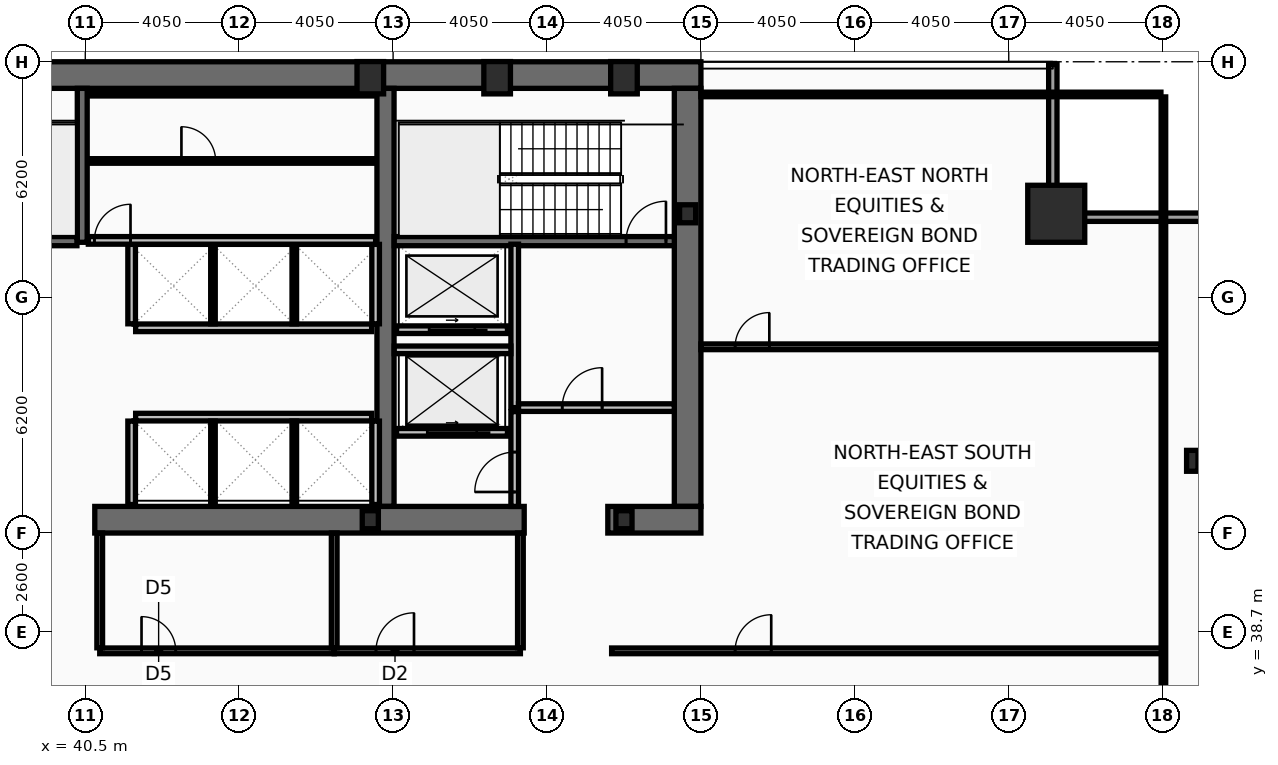
"""IFC4 building model, lengths in metres.
Left out: names, types, materials, properties, quantities, classifications, styles, units other than length and angle.
Written with IfcOpenShell. Run it as: python <this file> out.ifc"""

import sys

from ifc_helpers import new_model, si_unit, direction, frame, frame_2d, origin, origin_2d, place, context, subcontext, project, spatial, rectangle, hollow_rectangle, i_section, extrude, element, fill, save


model = new_model("IFC4")
c1 = context("Model", 3, precision=1e-05, world=origin(), true_north=direction((0.0, 1.0)))
c2 = subcontext(c1, "Body", "Model", "MODEL_VIEW")
j1 = project(units=[si_unit("LENGTHUNIT", "METRE"), si_unit("PLANEANGLEUNIT", "RADIAN")], contexts=[c1])
p1 = place(None, origin())
s1 = spatial("IfcSite", under=j1, at=p1, CompositionType="ELEMENT")
p2 = place(p1, origin())
s2 = spatial("IfcBuilding", under=s1, at=p2, CompositionType="ELEMENT")
p3 = place(p2, frame((0.0, 0.0, 98.6)))
s3 = spatial("IfcBuildingStorey", under=s2, at=p3, CompositionType="ELEMENT", Elevation=98.6)
p4 = place(p3, frame((16.2, 53.35, 0.0), z_axis=(0.0, 0.0, 1.0), x_axis=(1.0, 0.0, 0.0)))
e1 = element("IfcWall", 1, at=p4, inside=s3, PredefinedType="SHEAR", context=c2, shape_type="SweptSolid", body=[
    extrude(rectangle(XDim=40.5, YDim=0.7, at=frame_2d((20.25, 0.0))), origin(), (0.0, 0.0, 1.0), 3.82),
])
p5 = place(p3, frame((56.35, 53.0, 0.0), z_axis=(0.0, 0.0, 1.0), x_axis=(0.0, -1.0, 0.0)))
e2 = element("IfcWall", 2, at=p5, inside=s3, PredefinedType="SHEAR", context=c2, shape_type="SweptSolid", body=[
    extrude(rectangle(XDim=11.0, YDim=0.7, at=frame_2d((5.5, 0.0))), origin(), (0.0, 0.0, 1.0), 3.82),
])
p6 = place(p3, frame((48.4, 42.0, 0.0), z_axis=(0.0, 0.0, 1.0), x_axis=(0.0, 1.0, 0.0)))
e3 = element("IfcWall", 3, at=p6, inside=s3, PredefinedType="SHEAR", context=c2, shape_type="SweptSolid", body=[
    extrude(rectangle(XDim=11.0, YDim=0.45, at=frame_2d((5.5, 0.0))), origin(), (0.0, 0.0, 1.0), 3.82),
])
p7 = place(p3, frame((52.05, 41.65, 0.0), z_axis=(0.0, 0.0, 1.0), x_axis=(-1.0, 0.0, 0.0)))
e4 = element("IfcWall", 4, at=p7, inside=s3, PredefinedType="SHEAR", context=c2, shape_type="SweptSolid", body=[
    extrude(rectangle(XDim=11.3, YDim=0.7, at=frame_2d((5.65, 0.0))), origin(), (0.0, 0.0, 1.0), 3.82),
])
p8 = place(p3, frame((56.7, 41.65, 0.0), z_axis=(0.0, 0.0, 1.0), x_axis=(-1.0, 0.0, 0.0)))
e5 = element("IfcWall", 5, at=p8, inside=s3, PredefinedType="SHEAR", context=c2, shape_type="SweptSolid", body=[
    extrude(rectangle(XDim=2.45, YDim=0.7, at=frame_2d((1.225, 0.0))), origin(), (0.0, 0.0, 1.0), 3.82),
])
p9 = place(p3, frame((40.42, 48.95, 0.0), z_axis=(0.0, 0.0, 1.0), x_axis=(0.0, 1.0, 0.0)))
e6 = element("IfcWall", 6, at=p9, inside=s3, PredefinedType="SHEAR", context=c2, shape_type="SweptSolid", body=[
    extrude(rectangle(XDim=4.05, YDim=0.26, at=frame_2d((2.025, 0.0))), origin(), (0.0, 0.0, 1.0), 3.82),
])
p10 = place(p3, frame((48.63, 48.98, 0.0), z_axis=(0.0, 0.0, 1.0), x_axis=(1.0, 0.0, 0.0)))
e7 = element("IfcWall", 7, at=p10, inside=s3, PredefinedType="SHEAR", context=c2, shape_type="SweptSolid", body=[
    extrude(rectangle(XDim=7.37, YDim=0.24, at=frame_2d((3.685, 0.0))), origin(), (0.0, 0.0, 1.0), 3.82),
])
p11 = place(p10, frame((6.1, 0.0, 0.0)))
e8 = element("IfcOpeningElement", 8, at=p11, cuts=e7, PredefinedType="OPENING", context=c2, shape_type="SweptSolid", body=[
    extrude(rectangle(XDim=1.05, YDim=2.15, at=frame_2d((0.525, 1.075))), frame((0.0, 0.13, 0.0), z_axis=(0.0, -1.0, 0.0), x_axis=(1.0, 0.0, 0.0)), (0.0, 0.0, 1.0), 0.26),
])
p12 = place(p3, frame((32.72, 48.98, 0.0), z_axis=(0.0, 0.0, 1.0), x_axis=(1.0, 0.0, 0.0)))
e9 = element("IfcWall", 9, at=p12, inside=s3, PredefinedType="SHEAR", context=c2, shape_type="SweptSolid", body=[
    extrude(rectangle(XDim=7.56, YDim=0.24, at=frame_2d((3.78, 0.0))), origin(), (0.0, 0.0, 1.0), 3.82),
])
p13 = place(p12, frame((0.22, 0.0, 0.0)))
e10 = element("IfcOpeningElement", 10, at=p13, cuts=e9, PredefinedType="OPENING", context=c2, shape_type="SweptSolid", body=[
    extrude(rectangle(XDim=1.05, YDim=2.15, at=frame_2d((0.525, 1.075))), frame((0.0, 0.13, 0.0), z_axis=(0.0, -1.0, 0.0), x_axis=(1.0, 0.0, 0.0)), (0.0, 0.0, 1.0), 0.26),
])
p14 = place(p3, frame((66.05, 49.7, 0.0), z_axis=(0.0, 0.0, 1.0), x_axis=(1.0, 0.0, 0.0)))
e11 = element("IfcColumn", 11, at=p14, inside=s3, PredefinedType="COLUMN", context=c2, shape_type="SweptSolid", body=[
    extrude(hollow_rectangle(XDim=1.5, YDim=1.5, WallThickness=0.07, at=origin_2d()), origin(), (0.0, 0.0, 1.0), 4.0),
])
for number, where, z_axis, x_axis in (
    (12, (48.0, 53.28, 0.0), (0.0, 0.0, 1.0), (1.0, 0.0, 0.0)),
    (13, (51.337, 53.28, 0.0), (0.0, 0.0, 1.0), (1.0, 0.0, 0.0)),
    (14, (54.675, 53.28, 0.0), (0.0, 0.0, 1.0), (1.0, 0.0, 0.0)),
):
    element("IfcColumn", number, at=place(p3, frame(where, z_axis=z_axis, x_axis=x_axis)), inside=s3, PredefinedType="COLUMN", context=c2, shape_type="SweptSolid", body=[
        extrude(hollow_rectangle(XDim=0.7, YDim=0.85, WallThickness=0.05, at=origin_2d()), origin(), (0.0, 0.0, 1.0), 4.0),
    ])
p15 = place(p3, frame((69.63, 43.2, 0.0), z_axis=(0.0, 0.0, 1.0), x_axis=(1.0, 0.0, 0.0)))
e15 = element("IfcColumn", 15, at=p15, inside=s3, PredefinedType="COLUMN", context=c2, shape_type="SweptSolid", body=[
    extrude(i_section(OverallWidth=0.3, OverallDepth=0.55, WebThickness=0.015, FlangeThickness=0.029, at=origin_2d()), origin(), (0.0, 0.0, 1.0), 4.0),
])
for number, where, z_axis, x_axis in (
    (16, (56.35, 49.7, 0.0), (0.0, 0.0, 1.0), (1.0, 0.0, 0.0)),
    (17, (48.0, 41.65, 0.0), (0.0, 0.0, 1.0), (1.0, 0.0, 0.0)),
    (18, (54.675, 41.65, 0.0), (0.0, 0.0, 1.0), (1.0, 0.0, 0.0)),
):
    element("IfcColumn", number, at=place(p3, frame(where, z_axis=z_axis, x_axis=x_axis)), inside=s3, PredefinedType="COLUMN", context=c2, shape_type="SweptSolid", body=[
        extrude(i_section(OverallWidth=0.424, OverallDepth=0.474, WebThickness=0.048, FlangeThickness=0.077, at=origin_2d()), origin(), (0.0, 0.0, 1.0), 4.0),
    ])
p16 = place(p3, frame((65.96, 53.63, 0.0), z_axis=(0.0, 0.0, 1.0), x_axis=(0.0, -1.0, 0.0)))
e19 = element("IfcWall", 19, at=p16, inside=s3, PredefinedType="SOLIDWALL", context=c2, shape_type="SweptSolid", body=[
    extrude(rectangle(XDim=3.91, YDim=0.22, at=frame_2d((1.955, 0.0))), origin(), (0.0, 0.0, 1.0), 3.16),
])
p17 = place(p3, frame((65.85, 49.61, 0.0), z_axis=(0.0, 0.0, 1.0), x_axis=(1.0, 0.0, 0.0)))
e20 = element("IfcWall", 20, at=p17, inside=s3, PredefinedType="SOLIDWALL", context=c2, shape_type="SweptSolid", body=[
    extrude(rectangle(XDim=4.22, YDim=0.22, at=frame_2d((2.11, 0.0))), origin(), (0.0, 0.0, 1.0), 3.16),
])
p18 = place(p3, frame((51.61, 43.95, 0.0), z_axis=(0.0, 0.0, 1.0), x_axis=(-1.0, 0.0, 0.0)))
e21 = element("IfcWall", 21, at=p18, inside=s3, PredefinedType="PARTITIONING", context=c2, shape_type="SweptSolid", body=[
    extrude(rectangle(XDim=2.92, YDim=0.2, at=frame_2d((1.46, 0.0))), origin(), (0.0, 0.0, 1.0), 3.82),
])
p19 = place(p18, frame((0.81, 0.0, 0.0)))
e22 = element("IfcOpeningElement", 22, at=p19, cuts=e21, PredefinedType="OPENING", context=c2, shape_type="SweptSolid", body=[
    extrude(rectangle(XDim=1.3, YDim=2.18, at=frame_2d((0.65, 1.09))), frame((0.0, 0.11, 0.0), z_axis=(0.0, -1.0, 0.0), x_axis=(1.0, 0.0, 0.0)), (0.0, 0.0, 1.0), 0.22),
])
p20 = place(p3, frame((51.61, 46.65, 0.0), z_axis=(0.0, 0.0, 1.0), x_axis=(-1.0, 0.0, 0.0)))
e23 = element("IfcWall", 23, at=p20, inside=s3, PredefinedType="PARTITIONING", context=c2, shape_type="SweptSolid", body=[
    extrude(rectangle(XDim=2.92, YDim=0.2, at=frame_2d((1.46, 0.0))), origin(), (0.0, 0.0, 1.0), 3.82),
])
p21 = place(p20, frame((0.86, 0.0, 0.0)))
e24 = element("IfcOpeningElement", 24, at=p21, cuts=e23, PredefinedType="OPENING", context=c2, shape_type="SweptSolid", body=[
    extrude(rectangle(XDim=1.2, YDim=2.18, at=frame_2d((0.6, 1.09))), frame((0.0, 0.11, 0.0), z_axis=(0.0, -1.0, 0.0), x_axis=(1.0, 0.0, 0.0)), (0.0, 0.0, 1.0), 0.22),
])
p22 = place(p3, frame((51.8, 44.6, 0.0), z_axis=(0.0, 0.0, 1.0), x_axis=(0.0, 1.0, 0.0)))
e25 = element("IfcWall", 25, at=p22, inside=s3, PredefinedType="PARTITIONING", context=c2, shape_type="SweptSolid", body=[
    extrude(rectangle(XDim=4.3, YDim=0.2, at=frame_2d((2.15, 0.0))), origin(), (0.0, 0.0, 1.0), 3.82),
])
p23 = place(p3, frame((51.9, 44.6, 0.0), z_axis=(0.0, 0.0, 1.0), x_axis=(1.0, 0.0, 0.0)))
e26 = element("IfcWall", 26, at=p23, inside=s3, PredefinedType="PARTITIONING", context=c2, shape_type="SweptSolid", body=[
    extrude(rectangle(XDim=4.1, YDim=0.2, at=frame_2d((2.05, 0.0))), origin(), (0.0, 0.0, 1.0), 3.82),
])
p24 = place(p23, frame((1.15, 0.0, 0.0)))
e27 = element("IfcOpeningElement", 27, at=p24, cuts=e26, PredefinedType="OPENING", context=c2, shape_type="SweptSolid", body=[
    extrude(rectangle(XDim=1.05, YDim=2.15, at=frame_2d((0.525, 1.075))), frame((0.0, 0.11, 0.0), z_axis=(0.0, -1.0, 0.0), x_axis=(1.0, 0.0, 0.0)), (0.0, 0.0, 1.0), 0.22),
])
p25 = place(p3, frame((48.63, 46.12, 0.0), z_axis=(0.0, 0.0, 1.0), x_axis=(1.0, 0.0, 0.0)))
e28 = element("IfcWall", 28, at=p25, inside=s3, PredefinedType="PARTITIONING", context=c2, shape_type="SweptSolid", body=[
    extrude(rectangle(XDim=3.07, YDim=0.2, at=frame_2d((1.535, 0.0))), origin(), (0.0, 0.0, 1.0), 3.82),
])
p26 = place(p3, frame((51.8, 42.0, 0.0), z_axis=(0.0, 0.0, 1.0), x_axis=(0.0, 1.0, 0.0)))
e29 = element("IfcWall", 29, at=p26, inside=s3, PredefinedType="PARTITIONING", context=c2, shape_type="SweptSolid", body=[
    extrude(rectangle(XDim=2.495, YDim=0.2, at=frame_2d((1.248, 0.0))), origin(), (0.0, 0.0, 1.0), 3.82),
])
p27 = place(p26, frame((0.38, 0.0, 0.0)))
e30 = element("IfcOpeningElement", 30, at=p27, cuts=e29, PredefinedType="OPENING", context=c2, shape_type="SweptSolid", body=[
    extrude(rectangle(XDim=1.05, YDim=2.15, at=frame_2d((0.525, 1.075))), frame((0.0, 0.11, 0.0), z_axis=(0.0, -1.0, 0.0), x_axis=(1.0, 0.0, 0.0)), (0.0, 0.0, 1.0), 0.22),
])
p28 = place(p3, frame((41.825, 46.7, 0.0), z_axis=(0.0, 0.0, 1.0), x_axis=(1.0, 0.0, 0.0)))
e31 = element("IfcWall", 31, at=p28, inside=s3, PredefinedType="PARTITIONING", context=c2, shape_type="SweptSolid", body=[
    extrude(rectangle(XDim=6.21, YDim=0.2, at=frame_2d((3.105, 0.0))), origin(), (0.0, 0.0, 1.0), 3.82),
])
for number, where, z_axis, x_axis in (
    (32, (41.72, 46.805, 0.0), (0.0, 0.0, 1.0), (0.0, 1.0, 0.0)),
    (33, (48.14, 46.805, 0.0), (0.0, 0.0, 1.0), (0.0, 1.0, 0.0)),
):
    element("IfcWall", number, at=place(p3, frame(where, z_axis=z_axis, x_axis=x_axis)), inside=s3, PredefinedType="PARTITIONING", context=c2, shape_type="SweptSolid", body=[
        extrude(rectangle(XDim=2.09, YDim=0.2, at=frame_2d((1.045, 0.0))), origin(), (0.0, 0.0, 1.0), 3.82),
    ])
for number, where, z_axis, x_axis in (
    (34, (43.86, 46.805, 0.0), (0.0, 0.0, 1.0), (0.0, 1.0, 0.0)),
    (35, (46.0, 46.805, 0.0), (0.0, 0.0, 1.0), (0.0, 1.0, 0.0)),
):
    element("IfcWall", number, at=place(p3, frame(where, z_axis=z_axis, x_axis=x_axis)), inside=s3, PredefinedType="PARTITIONING", context=c2, shape_type="SweptSolid", body=[
        extrude(rectangle(XDim=2.09, YDim=0.12, at=frame_2d((1.045, 0.0))), origin(), (0.0, 0.0, 1.0), 3.82),
    ])
p29 = place(p3, frame((41.825, 44.35, 0.0), z_axis=(0.0, 0.0, 1.0), x_axis=(1.0, 0.0, 0.0)))
e36 = element("IfcWall", 36, at=p29, inside=s3, PredefinedType="PARTITIONING", context=c2, shape_type="SweptSolid", body=[
    extrude(rectangle(XDim=6.21, YDim=0.2, at=frame_2d((3.105, 0.0))), origin(), (0.0, 0.0, 1.0), 3.82),
])
for number, where, z_axis, x_axis in (
    (37, (41.72, 42.05, 0.0), (0.0, 0.0, 1.0), (0.0, 1.0, 0.0)),
    (38, (48.14, 42.05, 0.0), (0.0, 0.0, 1.0), (0.0, 1.0, 0.0)),
):
    element("IfcWall", number, at=place(p3, frame(where, z_axis=z_axis, x_axis=x_axis)), inside=s3, PredefinedType="PARTITIONING", context=c2, shape_type="SweptSolid", body=[
        extrude(rectangle(XDim=2.195, YDim=0.2, at=frame_2d((1.098, 0.0))), origin(), (0.0, 0.0, 1.0), 3.82),
    ])
for number, where, z_axis, x_axis in (
    (39, (43.86, 42.05, 0.0), (0.0, 0.0, 1.0), (0.0, 1.0, 0.0)),
    (40, (46.0, 42.05, 0.0), (0.0, 0.0, 1.0), (0.0, 1.0, 0.0)),
):
    element("IfcWall", number, at=place(p3, frame(where, z_axis=z_axis, x_axis=x_axis)), inside=s3, PredefinedType="PARTITIONING", context=c2, shape_type="SweptSolid", body=[
        extrude(rectangle(XDim=2.195, YDim=0.12, at=frame_2d((1.098, 0.0))), origin(), (0.0, 0.0, 1.0), 3.82),
    ])
p30 = place(p3, frame((40.58, 52.86, 0.0), z_axis=(0.0, 0.0, 1.0), x_axis=(1.0, 0.0, 0.0)))
e41 = element("IfcWall", 41, at=p30, inside=s3, PredefinedType="PARTITIONING", context=c2, shape_type="SweptSolid", body=[
    extrude(rectangle(XDim=7.56, YDim=0.12, at=frame_2d((3.78, 0.0))), origin(), (0.0, 0.0, 1.0), 3.82),
])
p31 = place(p3, frame((40.58, 49.0, 0.0), z_axis=(0.0, 0.0, 1.0), x_axis=(1.0, 0.0, 0.0)))
e42 = element("IfcWall", 42, at=p31, inside=s3, PredefinedType="PARTITIONING", context=c2, shape_type="SweptSolid", body=[
    extrude(rectangle(XDim=7.56, YDim=0.2, at=frame_2d((3.78, 0.0))), origin(), (0.0, 0.0, 1.0), 3.82),
])
p32 = place(p31, frame((0.16, 0.0, 0.0)))
e43 = element("IfcOpeningElement", 43, at=p32, cuts=e42, PredefinedType="OPENING", context=c2, shape_type="SweptSolid", body=[
    extrude(rectangle(XDim=0.95, YDim=2.1, at=frame_2d((0.475, 1.05))), frame((0.0, 0.11, 0.0), z_axis=(0.0, -1.0, 0.0), x_axis=(1.0, 0.0, 0.0)), (0.0, 0.0, 1.0), 0.22),
])
p33 = place(p3, frame((40.63, 51.09, 0.0), z_axis=(0.0, 0.0, 1.0), x_axis=(1.0, 0.0, 0.0)))
e44 = element("IfcWall", 44, at=p33, inside=s3, PredefinedType="PARTITIONING", context=c2, shape_type="SweptSolid", body=[
    extrude(rectangle(XDim=7.46, YDim=0.12, at=frame_2d((3.73, 0.0))), origin(), (0.0, 0.0, 1.0), 3.82),
])
p34 = place(p33, frame((2.4, 0.0, 0.0)))
e45 = element("IfcOpeningElement", 45, at=p34, cuts=e44, PredefinedType="OPENING", context=c2, shape_type="SweptSolid", body=[
    extrude(rectangle(XDim=0.9, YDim=2.05, at=frame_2d((0.45, 1.025))), frame((0.0, 0.07, 0.0), z_axis=(0.0, -1.0, 0.0), x_axis=(1.0, 0.0, 0.0)), (0.0, 0.0, 1.0), 0.14),
])
p35 = place(p3, frame((40.88, 38.2, 0.0), z_axis=(0.0, 0.0, 1.0), x_axis=(1.0, 0.0, 0.0)))
e46 = element("IfcWall", 46, at=p35, inside=s3, PredefinedType="PARTITIONING", context=c2, shape_type="SweptSolid", body=[
    extrude(rectangle(XDim=6.17, YDim=0.15, at=frame_2d((3.085, 0.0))), origin(), (0.0, 0.0, 1.0), 3.01),
])
p36 = place(p35, frame((1.1, 0.0, 0.0)))
e47 = element("IfcOpeningElement", 47, at=p36, cuts=e46, PredefinedType="OPENING", context=c2, shape_type="SweptSolid", body=[
    extrude(rectangle(XDim=0.9, YDim=2.05, at=frame_2d((0.45, 1.025))), frame((0.0, 0.085, 0.0), z_axis=(0.0, -1.0, 0.0), x_axis=(1.0, 0.0, 0.0)), (0.0, 0.0, 1.0), 0.17),
])
p37 = place(p3, frame((47.05, 38.2, 0.0), z_axis=(0.0, 0.0, 1.0), x_axis=(1.0, 0.0, 0.0)))
e48 = element("IfcWall", 48, at=p37, inside=s3, PredefinedType="PARTITIONING", context=c2, shape_type="SweptSolid", body=[
    extrude(rectangle(XDim=4.9, YDim=0.15, at=frame_2d((2.45, 0.0))), origin(), (0.0, 0.0, 1.0), 3.01),
])
p38 = place(p37, frame((1.1, 0.0, 0.0)))
e49 = element("IfcOpeningElement", 49, at=p38, cuts=e48, PredefinedType="OPENING", context=c2, shape_type="SweptSolid", body=[
    extrude(rectangle(XDim=1.0, YDim=2.05, at=frame_2d((0.5, 1.025))), frame((0.0, 0.085, 0.0), z_axis=(0.0, -1.0, 0.0), x_axis=(1.0, 0.0, 0.0)), (0.0, 0.0, 1.0), 0.17),
])
for number, where, z_axis, x_axis in (
    (50, (40.88, 38.28, 0.0), (0.0, 0.0, 1.0), (0.0, 1.0, 0.0)),
    (51, (47.05, 38.28, 0.0), (0.0, 0.0, 1.0), (0.0, 1.0, 0.0)),
    (52, (51.95, 38.28, 0.0), (0.0, 0.0, 1.0), (0.0, 1.0, 0.0)),
):
    element("IfcWall", number, at=place(p3, frame(where, z_axis=z_axis, x_axis=x_axis)), inside=s3, PredefinedType="PARTITIONING", context=c2, shape_type="SweptSolid", body=[
        extrude(rectangle(XDim=3.02, YDim=0.15, at=frame_2d((1.51, 0.0))), origin(), (0.0, 0.0, 1.0), 3.82),
    ])
p39 = place(p3, frame((54.35, 38.2, 0.0), z_axis=(0.0, 0.0, 1.0), x_axis=(1.0, 0.0, 0.0)))
e53 = element("IfcWall", 53, at=p39, inside=s3, PredefinedType="PARTITIONING", context=c2, shape_type="SweptSolid", body=[
    extrude(rectangle(XDim=14.52, YDim=0.15, at=frame_2d((7.26, 0.0))), origin(), (0.0, 0.0, 1.0), 3.01),
])
p40 = place(p39, frame((3.25, 0.0, 0.0)))
e54 = element("IfcOpeningElement", 54, at=p40, cuts=e53, PredefinedType="OPENING", context=c2, shape_type="SweptSolid", body=[
    extrude(rectangle(XDim=0.95, YDim=2.05, at=frame_2d((0.475, 1.025))), frame((0.0, 0.085, 0.0), z_axis=(0.0, -1.0, 0.0), x_axis=(1.0, 0.0, 0.0)), (0.0, 0.0, 1.0), 0.17),
])
p41 = place(p3, frame((56.7, 46.2, 0.0), z_axis=(0.0, 0.0, 1.0), x_axis=(1.0, 0.0, 0.0)))
e55 = element("IfcWall", 55, at=p41, inside=s3, PredefinedType="PARTITIONING", context=c2, shape_type="SweptSolid", body=[
    extrude(rectangle(XDim=12.105, YDim=0.15, at=frame_2d((6.052, 0.0))), origin(), (0.0, 0.0, 1.0), 3.16),
])
p42 = place(p41, frame((0.9, 0.0, 0.0)))
e56 = element("IfcOpeningElement", 56, at=p42, cuts=e55, PredefinedType="OPENING", context=c2, shape_type="SweptSolid", body=[
    extrude(rectangle(XDim=0.9, YDim=2.05, at=frame_2d((0.45, 1.025))), frame((0.0, 0.085, 0.0), z_axis=(0.0, -1.0, 0.0), x_axis=(1.0, 0.0, 0.0)), (0.0, 0.0, 1.0), 0.17),
])
p43 = place(p3, frame((68.87, 10.665, 0.0), z_axis=(0.0, 0.0, 1.0), x_axis=(0.0, 1.0, 0.0)))
e57 = element("IfcWall", 57, at=p43, inside=s3, PredefinedType="PARTITIONING", context=c2, shape_type="SweptSolid", body=[
    extrude(rectangle(XDim=42.11, YDim=0.12, at=frame_2d((21.055, 0.0))), origin(), (0.0, 0.0, 1.0), 3.01),
])
p44 = place(p3, frame((56.7, 52.84, 0.0), z_axis=(0.0, 0.0, 1.0), x_axis=(1.0, 0.0, 0.0)))
e58 = element("IfcWall", 58, at=p44, inside=s3, PredefinedType="PARTITIONING", context=c2, shape_type="SweptSolid", body=[
    extrude(rectangle(XDim=12.105, YDim=0.12, at=frame_2d((6.052, 0.0))), origin(), (0.0, 0.0, 1.0), 3.82),
])
p45 = place(p11, origin())
e59 = element("IfcDoor", 59, at=p45, inside=s3, OperationType="SINGLE_SWING_RIGHT", PredefinedType="DOOR", context=c2, shape_type="SweptSolid", body=[
    extrude(rectangle(XDim=1.05, YDim=2.15, at=frame_2d((0.525, 1.075))), frame((0.0, 0.025, 0.0), z_axis=(0.0, -1.0, 0.0), x_axis=(1.0, 0.0, 0.0)), (0.0, 0.0, 1.0), 0.05),
])
fill(e8, e59)
p46 = place(p19, origin())
e60 = element("IfcDoor", 60, at=p46, inside=s3, OperationType="SLIDING_TO_LEFT", PredefinedType="DOOR", context=c2, shape_type="SweptSolid", body=[
    extrude(rectangle(XDim=1.3, YDim=2.18, at=frame_2d((0.65, 1.09))), frame((0.0, 0.025, 0.0), z_axis=(0.0, -1.0, 0.0), x_axis=(1.0, 0.0, 0.0)), (0.0, 0.0, 1.0), 0.05),
])
fill(e22, e60)
p47 = place(p21, origin())
e61 = element("IfcDoor", 61, at=p47, inside=s3, OperationType="SLIDING_TO_LEFT", PredefinedType="DOOR", context=c2, shape_type="SweptSolid", body=[
    extrude(rectangle(XDim=1.2, YDim=2.18, at=frame_2d((0.6, 1.09))), frame((0.0, 0.025, 0.0), z_axis=(0.0, -1.0, 0.0), x_axis=(1.0, 0.0, 0.0)), (0.0, 0.0, 1.0), 0.05),
])
fill(e24, e61)
p48 = place(p24, origin())
e62 = element("IfcDoor", 62, at=p48, inside=s3, OperationType="SINGLE_SWING_RIGHT", PredefinedType="DOOR", context=c2, shape_type="SweptSolid", body=[
    extrude(rectangle(XDim=1.05, YDim=2.15, at=frame_2d((0.525, 1.075))), frame((0.0, 0.025, 0.0), z_axis=(0.0, -1.0, 0.0), x_axis=(1.0, 0.0, 0.0)), (0.0, 0.0, 1.0), 0.05),
])
fill(e27, e62)
p49 = place(p27, origin())
e63 = element("IfcDoor", 63, at=p49, inside=s3, OperationType="SINGLE_SWING_LEFT", PredefinedType="DOOR", context=c2, shape_type="SweptSolid", body=[
    extrude(rectangle(XDim=1.05, YDim=2.15, at=frame_2d((0.525, 1.075))), frame((0.0, 0.025, 0.0), z_axis=(0.0, -1.0, 0.0), x_axis=(1.0, 0.0, 0.0)), (0.0, 0.0, 1.0), 0.05),
])
fill(e30, e63)
p50 = place(p32, origin())
e64 = element("IfcDoor", 64, at=p50, inside=s3, OperationType="SINGLE_SWING_RIGHT", PredefinedType="DOOR", context=c2, shape_type="SweptSolid", body=[
    extrude(rectangle(XDim=0.95, YDim=2.1, at=frame_2d((0.475, 1.05))), frame((0.0, 0.025, 0.0), z_axis=(0.0, -1.0, 0.0), x_axis=(1.0, 0.0, 0.0)), (0.0, 0.0, 1.0), 0.05),
])
fill(e43, e64)
p51 = place(p34, origin())
e65 = element("IfcDoor", 65, at=p51, inside=s3, OperationType="SINGLE_SWING_LEFT", PredefinedType="DOOR", context=c2, shape_type="SweptSolid", body=[
    extrude(rectangle(XDim=0.9, YDim=2.05, at=frame_2d((0.45, 1.025))), frame((0.0, 0.025, 0.0), z_axis=(0.0, -1.0, 0.0), x_axis=(1.0, 0.0, 0.0)), (0.0, 0.0, 1.0), 0.05),
])
fill(e45, e65)
p52 = place(p36, origin())
e66 = element("IfcDoor", 66, at=p52, inside=s3, OperationType="SINGLE_SWING_LEFT", PredefinedType="DOOR", context=c2, shape_type="SweptSolid", body=[
    extrude(rectangle(XDim=0.9, YDim=2.05, at=frame_2d((0.45, 1.025))), frame((0.0, 0.025, 0.0), z_axis=(0.0, -1.0, 0.0), x_axis=(1.0, 0.0, 0.0)), (0.0, 0.0, 1.0), 0.05),
])
fill(e47, e66)
p53 = place(p38, origin())
e67 = element("IfcDoor", 67, at=p53, inside=s3, OperationType="SINGLE_SWING_RIGHT", PredefinedType="DOOR", context=c2, shape_type="SweptSolid", body=[
    extrude(rectangle(XDim=1.0, YDim=2.05, at=frame_2d((0.5, 1.025))), frame((0.0, 0.025, 0.0), z_axis=(0.0, -1.0, 0.0), x_axis=(1.0, 0.0, 0.0)), (0.0, 0.0, 1.0), 0.05),
])
fill(e49, e67)
p54 = place(p40, origin())
e68 = element("IfcDoor", 68, at=p54, inside=s3, OperationType="SINGLE_SWING_RIGHT", PredefinedType="DOOR", context=c2, shape_type="SweptSolid", body=[
    extrude(rectangle(XDim=0.95, YDim=2.05, at=frame_2d((0.475, 1.025))), frame((0.0, 0.025, 0.0), z_axis=(0.0, -1.0, 0.0), x_axis=(1.0, 0.0, 0.0)), (0.0, 0.0, 1.0), 0.05),
])
fill(e54, e68)
p55 = place(p42, origin())
e69 = element("IfcDoor", 69, at=p55, inside=s3, OperationType="SINGLE_SWING_RIGHT", PredefinedType="DOOR", context=c2, shape_type="SweptSolid", body=[
    extrude(rectangle(XDim=0.9, YDim=2.05, at=frame_2d((0.45, 1.025))), frame((0.0, 0.025, 0.0), z_axis=(0.0, -1.0, 0.0), x_axis=(1.0, 0.0, 0.0)), (0.0, 0.0, 1.0), 0.05),
])
fill(e56, e69)
save(model, sys.argv[1])
